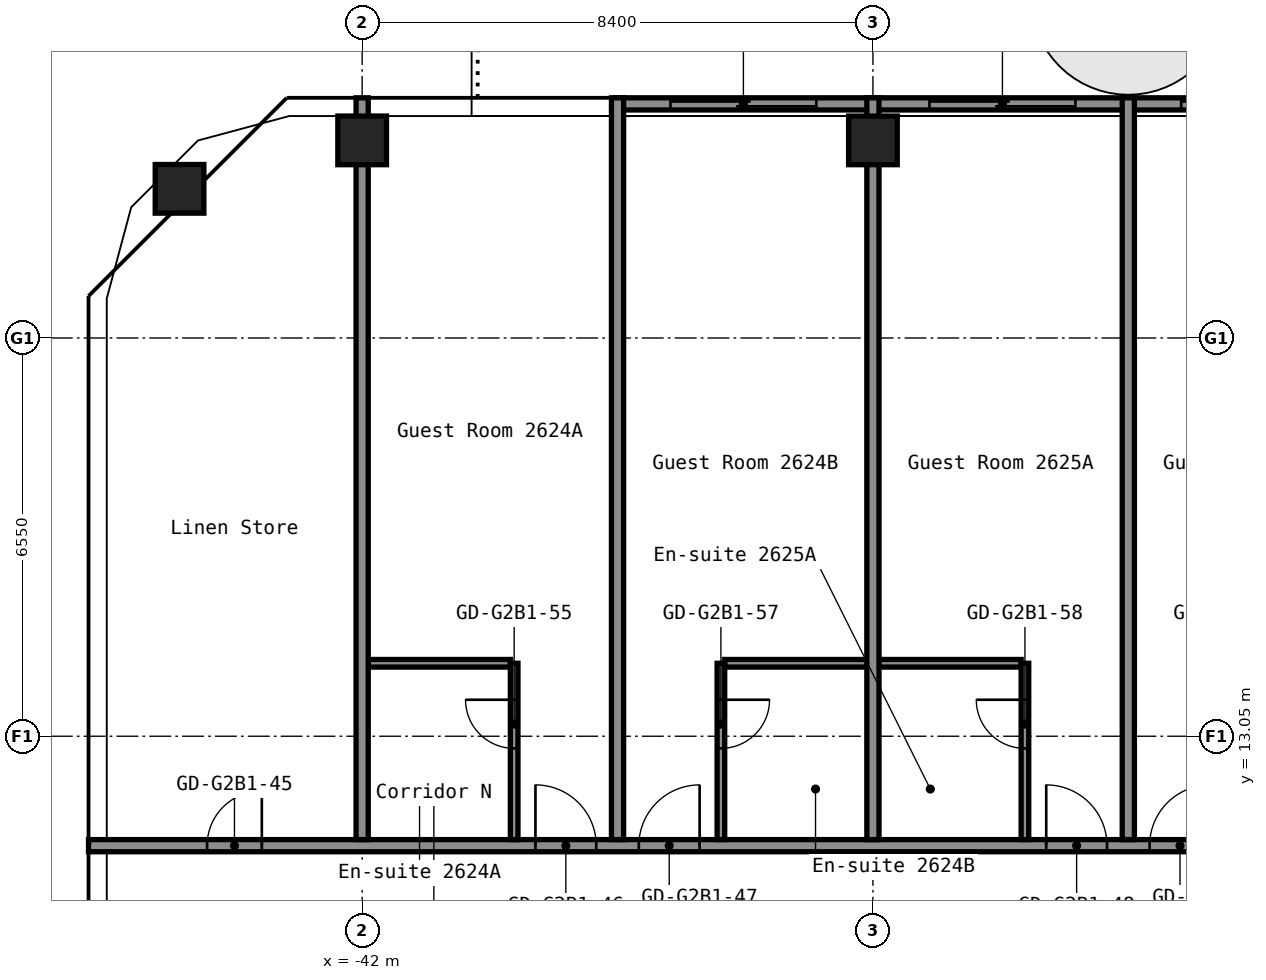
"""IFC4 building model, lengths in metres.
Left out: names, types, materials, properties, quantities, classifications, styles, units other than length and angle.
Written with IfcOpenShell. Run it as: python <this file> out.ifc"""

import sys

from ifc_helpers import new_model, si_unit, direction, frame, frame_2d, origin, origin_2d, place, context, subcontext, project, spatial, rectangle, hollow_rectangle, extrude, element, fill, save


model = new_model("IFC4")
c1 = context("Model", 3, precision=1e-05, world=origin(), true_north=direction((0.0, 1.0)))
c2 = subcontext(c1, "Body", "Model", "MODEL_VIEW")
j1 = project(units=[si_unit("LENGTHUNIT", "METRE"), si_unit("PLANEANGLEUNIT", "RADIAN")], contexts=[c1])
p1 = place(None, origin())
s1 = spatial("IfcSite", under=j1, at=p1, CompositionType="ELEMENT")
p2 = place(p1, origin())
s2 = spatial("IfcBuilding", under=s1, at=p2, CompositionType="ELEMENT")
p3 = place(p2, frame((0.0, 0.0, 94.6)))
s3 = spatial("IfcBuildingStorey", under=s2, at=p3, CompositionType="ELEMENT", Elevation=94.6)
for number, where, z_axis, x_axis in (
    (1, (-45.003, 22.053, 0.0), (0.0, 0.0, 1.0), (1.0, 0.0, 0.0)),
    (2, (-42.0, 22.85, 0.0), (0.0, 0.0, 1.0), (1.0, 0.0, 0.0)),
    (3, (-33.6, 22.85, 0.0), (0.0, 0.0, 1.0), (1.0, 0.0, 0.0)),
):
    element("IfcColumn", number, at=place(p3, frame(where, z_axis=z_axis, x_axis=x_axis)), inside=s3, PredefinedType="COLUMN", context=c2, shape_type="SweptSolid", body=[
        extrude(hollow_rectangle(XDim=0.8, YDim=0.8, WallThickness=0.032, at=origin_2d()), origin(), (0.0, 0.0, 1.0), 2.8),
    ])
p4 = place(p3, frame((-46.5, 11.25, 0.0), z_axis=(0.0, 0.0, 1.0), x_axis=(1.0, 0.0, 0.0)))
e4 = element("IfcWall", 4, at=p4, inside=s3, PredefinedType="PARTITIONING", context=c2, shape_type="SweptSolid", body=[
    extrude(rectangle(XDim=29.7, YDim=0.2, at=frame_2d((14.85, 0.0))), origin(), (0.0, 0.0, 1.0), 2.8),
])
p5 = place(p4, frame((1.95, 0.0, 0.0)))
e5 = element("IfcOpeningElement", 5, at=p5, cuts=e4, PredefinedType="OPENING", context=c2, shape_type="SweptSolid", body=[
    extrude(rectangle(XDim=0.9, YDim=2.1, at=frame_2d((0.45, 1.05))), frame((0.0, 0.11, 0.0), z_axis=(0.0, -1.0, 0.0), x_axis=(1.0, 0.0, 0.0)), (0.0, 0.0, 1.0), 0.22),
])
p6 = place(p4, frame((7.35, 0.0, 0.0)))
e6 = element("IfcOpeningElement", 6, at=p6, cuts=e4, PredefinedType="OPENING", context=c2, shape_type="SweptSolid", body=[
    extrude(rectangle(XDim=1.0, YDim=2.1, at=frame_2d((0.5, 1.05))), frame((0.0, 0.11, 0.0), z_axis=(0.0, -1.0, 0.0), x_axis=(1.0, 0.0, 0.0)), (0.0, 0.0, 1.0), 0.22),
])
p7 = place(p4, frame((9.05, 0.0, 0.0)))
e7 = element("IfcOpeningElement", 7, at=p7, cuts=e4, PredefinedType="OPENING", context=c2, shape_type="SweptSolid", body=[
    extrude(rectangle(XDim=1.0, YDim=2.1, at=frame_2d((0.5, 1.05))), frame((0.0, 0.11, 0.0), z_axis=(0.0, -1.0, 0.0), x_axis=(1.0, 0.0, 0.0)), (0.0, 0.0, 1.0), 0.22),
])
p8 = place(p4, frame((15.75, 0.0, 0.0)))
e8 = element("IfcOpeningElement", 8, at=p8, cuts=e4, PredefinedType="OPENING", context=c2, shape_type="SweptSolid", body=[
    extrude(rectangle(XDim=1.0, YDim=2.1, at=frame_2d((0.5, 1.05))), frame((0.0, 0.11, 0.0), z_axis=(0.0, -1.0, 0.0), x_axis=(1.0, 0.0, 0.0)), (0.0, 0.0, 1.0), 0.22),
])
p9 = place(p4, frame((17.45, 0.0, 0.0)))
e9 = element("IfcOpeningElement", 9, at=p9, cuts=e4, PredefinedType="OPENING", context=c2, shape_type="SweptSolid", body=[
    extrude(rectangle(XDim=1.0, YDim=2.1, at=frame_2d((0.5, 1.05))), frame((0.0, 0.11, 0.0), z_axis=(0.0, -1.0, 0.0), x_axis=(1.0, 0.0, 0.0)), (0.0, 0.0, 1.0), 0.22),
])
p10 = place(p4, frame((23.2, 0.0, 0.0)))
e10 = element("IfcOpeningElement", 10, at=p10, cuts=e4, PredefinedType="OPENING", context=c2, shape_type="SweptSolid", body=[
    extrude(rectangle(XDim=1.0, YDim=2.1, at=frame_2d((0.5, 1.05))), frame((0.0, 0.11, 0.0), z_axis=(0.0, -1.0, 0.0), x_axis=(1.0, 0.0, 0.0)), (0.0, 0.0, 1.0), 0.22),
])
p11 = place(p3, frame((-41.9, 14.25, 0.0), z_axis=(0.0, 0.0, 1.0), x_axis=(1.0, 0.0, 0.0)))
e11 = element("IfcWall", 11, at=p11, inside=s3, PredefinedType="PARTITIONING", context=c2, shape_type="SweptSolid", body=[
    extrude(rectangle(XDim=2.337, YDim=0.125, at=frame_2d((1.169, 0.0))), origin(), (0.0, 0.0, 1.0), 2.8),
])
p12 = place(p3, frame((-36.038, 14.25, 0.0), z_axis=(0.0, 0.0, 1.0), x_axis=(1.0, 0.0, 0.0)))
e12 = element("IfcWall", 12, at=p12, inside=s3, PredefinedType="PARTITIONING", context=c2, shape_type="SweptSolid", body=[
    extrude(rectangle(XDim=4.875, YDim=0.125, at=frame_2d((2.438, 0.0))), origin(), (0.0, 0.0, 1.0), 2.8),
])
p13 = place(p3, frame((-42.0, 11.35, 0.0), z_axis=(0.0, 0.0, 1.0), x_axis=(0.0, 1.0, 0.0)))
e13 = element("IfcWall", 13, at=p13, inside=s3, PredefinedType="PARTITIONING", context=c2, shape_type="SweptSolid", body=[
    extrude(rectangle(XDim=12.2, YDim=0.2, at=frame_2d((6.1, 0.0))), origin(), (0.0, 0.0, 1.0), 2.8),
])
p14 = place(p3, frame((-39.5, 11.35, 0.0), z_axis=(0.0, 0.0, 1.0), x_axis=(0.0, 1.0, 0.0)))
e14 = element("IfcWall", 14, at=p14, inside=s3, PredefinedType="PARTITIONING", context=c2, shape_type="SweptSolid", body=[
    extrude(rectangle(XDim=2.9, YDim=0.125, at=frame_2d((1.45, 0.0))), origin(), (0.0, 0.0, 1.0), 2.8),
])
p15 = place(p14, frame((1.5, 0.0, 0.0)))
e15 = element("IfcOpeningElement", 15, at=p15, cuts=e14, PredefinedType="OPENING", context=c2, shape_type="SweptSolid", body=[
    extrude(rectangle(XDim=0.8, YDim=2.1, at=frame_2d((0.4, 1.05))), frame((0.0, 0.073, 0.0), z_axis=(0.0, -1.0, 0.0), x_axis=(1.0, 0.0, 0.0)), (0.0, 0.0, 1.0), 0.145),
])
p16 = place(p3, frame((-37.8, 11.35, 0.0), z_axis=(0.0, 0.0, 1.0), x_axis=(0.0, 1.0, 0.0)))
e16 = element("IfcWall", 16, at=p16, inside=s3, PredefinedType="PARTITIONING", context=c2, shape_type="SweptSolid", body=[
    extrude(rectangle(XDim=12.2, YDim=0.2, at=frame_2d((6.1, 0.0))), origin(), (0.0, 0.0, 1.0), 2.8),
])
p17 = place(p3, frame((-36.1, 11.35, 0.0), z_axis=(0.0, 0.0, 1.0), x_axis=(0.0, 1.0, 0.0)))
e17 = element("IfcWall", 17, at=p17, inside=s3, PredefinedType="PARTITIONING", context=c2, shape_type="SweptSolid", body=[
    extrude(rectangle(XDim=2.9, YDim=0.125, at=frame_2d((1.45, 0.0))), origin(), (0.0, 0.0, 1.0), 2.8),
])
p18 = place(p17, frame((1.5, 0.0, 0.0)))
e18 = element("IfcOpeningElement", 18, at=p18, cuts=e17, PredefinedType="OPENING", context=c2, shape_type="SweptSolid", body=[
    extrude(rectangle(XDim=0.8, YDim=2.1, at=frame_2d((0.4, 1.05))), frame((0.0, 0.073, 0.0), z_axis=(0.0, -1.0, 0.0), x_axis=(1.0, 0.0, 0.0)), (0.0, 0.0, 1.0), 0.145),
])
p19 = place(p3, frame((-33.6, 11.35, 0.0), z_axis=(0.0, 0.0, 1.0), x_axis=(0.0, 1.0, 0.0)))
e19 = element("IfcWall", 19, at=p19, inside=s3, PredefinedType="PARTITIONING", context=c2, shape_type="SweptSolid", body=[
    extrude(rectangle(XDim=12.2, YDim=0.2, at=frame_2d((6.1, 0.0))), origin(), (0.0, 0.0, 1.0), 2.8),
])
p20 = place(p3, frame((-31.1, 11.35, 0.0), z_axis=(0.0, 0.0, 1.0), x_axis=(0.0, 1.0, 0.0)))
e20 = element("IfcWall", 20, at=p20, inside=s3, PredefinedType="PARTITIONING", context=c2, shape_type="SweptSolid", body=[
    extrude(rectangle(XDim=2.9, YDim=0.125, at=frame_2d((1.45, 0.0))), origin(), (0.0, 0.0, 1.0), 2.8),
])
p21 = place(p20, frame((1.5, 0.0, 0.0)))
e21 = element("IfcOpeningElement", 21, at=p21, cuts=e20, PredefinedType="OPENING", context=c2, shape_type="SweptSolid", body=[
    extrude(rectangle(XDim=0.8, YDim=2.1, at=frame_2d((0.4, 1.05))), frame((0.0, 0.073, 0.0), z_axis=(0.0, -1.0, 0.0), x_axis=(1.0, 0.0, 0.0)), (0.0, 0.0, 1.0), 0.145),
])
p22 = place(p3, frame((-29.4, 11.35, 0.0), z_axis=(0.0, 0.0, 1.0), x_axis=(0.0, 1.0, 0.0)))
e22 = element("IfcWall", 22, at=p22, inside=s3, PredefinedType="PARTITIONING", context=c2, shape_type="SweptSolid", body=[
    extrude(rectangle(XDim=12.2, YDim=0.2, at=frame_2d((6.1, 0.0))), origin(), (0.0, 0.0, 1.0), 2.8),
])
p23 = place(p3, frame((-25.22, 23.45, 0.0), z_axis=(0.0, 0.0, 1.0), x_axis=(-1.0, 0.0, 0.0)))
p24 = place(p23, frame((0.91, 0.0, 0.0)))
p25 = place(p24, frame((2.4, 0.0, 0.0), z_axis=(0.0, 0.0, 1.0), x_axis=(-1.0, 0.0, 0.0)))
e23 = element("IfcDoor", 23, at=p25, inside=s3, OperationType="SLIDING_TO_LEFT", PredefinedType="DOOR", context=c2, shape_type="SweptSolid", body=[
    extrude(rectangle(XDim=2.4, YDim=2.2, at=frame_2d((1.2, 1.1))), frame((0.0, 0.025, 0.0), z_axis=(0.0, -1.0, 0.0), x_axis=(1.0, 0.0, 0.0)), (0.0, 0.0, 1.0), 0.05),
])
p26 = place(p3, frame((-29.36, 23.45, 0.0), z_axis=(0.0, 0.0, 1.0), x_axis=(-1.0, 0.0, 0.0)))
p27 = place(p26, frame((0.91, 0.0, 0.0)))
p28 = place(p27, frame((2.4, 0.0, 0.0), z_axis=(0.0, 0.0, 1.0), x_axis=(-1.0, 0.0, 0.0)))
e24 = element("IfcDoor", 24, at=p28, inside=s3, OperationType="SLIDING_TO_LEFT", PredefinedType="DOOR", context=c2, shape_type="SweptSolid", body=[
    extrude(rectangle(XDim=2.4, YDim=2.2, at=frame_2d((1.2, 1.1))), frame((0.0, 0.025, 0.0), z_axis=(0.0, -1.0, 0.0), x_axis=(1.0, 0.0, 0.0)), (0.0, 0.0, 1.0), 0.05),
])
p29 = place(p3, frame((-33.62, 23.45, 0.0), z_axis=(0.0, 0.0, 1.0), x_axis=(-1.0, 0.0, 0.0)))
p30 = place(p29, frame((0.91, 0.0, 0.0)))
p31 = place(p30, frame((2.4, 0.0, 0.0), z_axis=(0.0, 0.0, 1.0), x_axis=(-1.0, 0.0, 0.0)))
e25 = element("IfcDoor", 25, at=p31, inside=s3, OperationType="SLIDING_TO_LEFT", PredefinedType="DOOR", context=c2, shape_type="SweptSolid", body=[
    extrude(rectangle(XDim=2.4, YDim=2.2, at=frame_2d((1.2, 1.1))), frame((0.0, 0.025, 0.0), z_axis=(0.0, -1.0, 0.0), x_axis=(1.0, 0.0, 0.0)), (0.0, 0.0, 1.0), 0.05),
])
p32 = place(p5, origin())
e26 = element("IfcDoor", 26, at=p32, inside=s3, OperationType="SINGLE_SWING_LEFT", PredefinedType="DOOR", context=c2, shape_type="SweptSolid", body=[
    extrude(rectangle(XDim=0.9, YDim=2.1, at=frame_2d((0.45, 1.05))), frame((0.0, 0.025, 0.0), z_axis=(0.0, -1.0, 0.0), x_axis=(1.0, 0.0, 0.0)), (0.0, 0.0, 1.0), 0.05),
])
fill(e5, e26)
p33 = place(p6, origin())
e27 = element("IfcDoor", 27, at=p33, inside=s3, OperationType="SINGLE_SWING_RIGHT", PredefinedType="DOOR", context=c2, shape_type="SweptSolid", body=[
    extrude(rectangle(XDim=1.0, YDim=2.1, at=frame_2d((0.5, 1.05))), frame((0.0, 0.025, 0.0), z_axis=(0.0, -1.0, 0.0), x_axis=(1.0, 0.0, 0.0)), (0.0, 0.0, 1.0), 0.05),
])
fill(e6, e27)
p34 = place(p7, origin())
e28 = element("IfcDoor", 28, at=p34, inside=s3, OperationType="SINGLE_SWING_LEFT", PredefinedType="DOOR", context=c2, shape_type="SweptSolid", body=[
    extrude(rectangle(XDim=1.0, YDim=2.1, at=frame_2d((0.5, 1.05))), frame((0.0, 0.025, 0.0), z_axis=(0.0, -1.0, 0.0), x_axis=(1.0, 0.0, 0.0)), (0.0, 0.0, 1.0), 0.05),
])
fill(e7, e28)
p35 = place(p8, origin())
e29 = element("IfcDoor", 29, at=p35, inside=s3, OperationType="SINGLE_SWING_RIGHT", PredefinedType="DOOR", context=c2, shape_type="SweptSolid", body=[
    extrude(rectangle(XDim=1.0, YDim=2.1, at=frame_2d((0.5, 1.05))), frame((0.0, 0.025, 0.0), z_axis=(0.0, -1.0, 0.0), x_axis=(1.0, 0.0, 0.0)), (0.0, 0.0, 1.0), 0.05),
])
fill(e8, e29)
p36 = place(p9, origin())
e30 = element("IfcDoor", 30, at=p36, inside=s3, OperationType="SINGLE_SWING_LEFT", PredefinedType="DOOR", context=c2, shape_type="SweptSolid", body=[
    extrude(rectangle(XDim=1.0, YDim=2.1, at=frame_2d((0.5, 1.05))), frame((0.0, 0.025, 0.0), z_axis=(0.0, -1.0, 0.0), x_axis=(1.0, 0.0, 0.0)), (0.0, 0.0, 1.0), 0.05),
])
fill(e9, e30)
p37 = place(p15, origin())
e31 = element("IfcDoor", 31, at=p37, inside=s3, OperationType="SINGLE_SWING_LEFT", PredefinedType="DOOR", context=c2, shape_type="SweptSolid", body=[
    extrude(rectangle(XDim=0.8, YDim=2.1, at=frame_2d((0.4, 1.05))), frame((0.0, 0.025, 0.0), z_axis=(0.0, -1.0, 0.0), x_axis=(1.0, 0.0, 0.0)), (0.0, 0.0, 1.0), 0.05),
])
fill(e15, e31)
p38 = place(p18, origin())
e32 = element("IfcDoor", 32, at=p38, inside=s3, OperationType="SINGLE_SWING_RIGHT", PredefinedType="DOOR", context=c2, shape_type="SweptSolid", body=[
    extrude(rectangle(XDim=0.8, YDim=2.1, at=frame_2d((0.4, 1.05))), frame((0.0, 0.025, 0.0), z_axis=(0.0, -1.0, 0.0), x_axis=(1.0, 0.0, 0.0)), (0.0, 0.0, 1.0), 0.05),
])
fill(e18, e32)
p39 = place(p21, origin())
e33 = element("IfcDoor", 33, at=p39, inside=s3, OperationType="SINGLE_SWING_LEFT", PredefinedType="DOOR", context=c2, shape_type="SweptSolid", body=[
    extrude(rectangle(XDim=0.8, YDim=2.1, at=frame_2d((0.4, 1.05))), frame((0.0, 0.025, 0.0), z_axis=(0.0, -1.0, 0.0), x_axis=(1.0, 0.0, 0.0)), (0.0, 0.0, 1.0), 0.05),
])
fill(e21, e33)
save(model, sys.argv[1])
